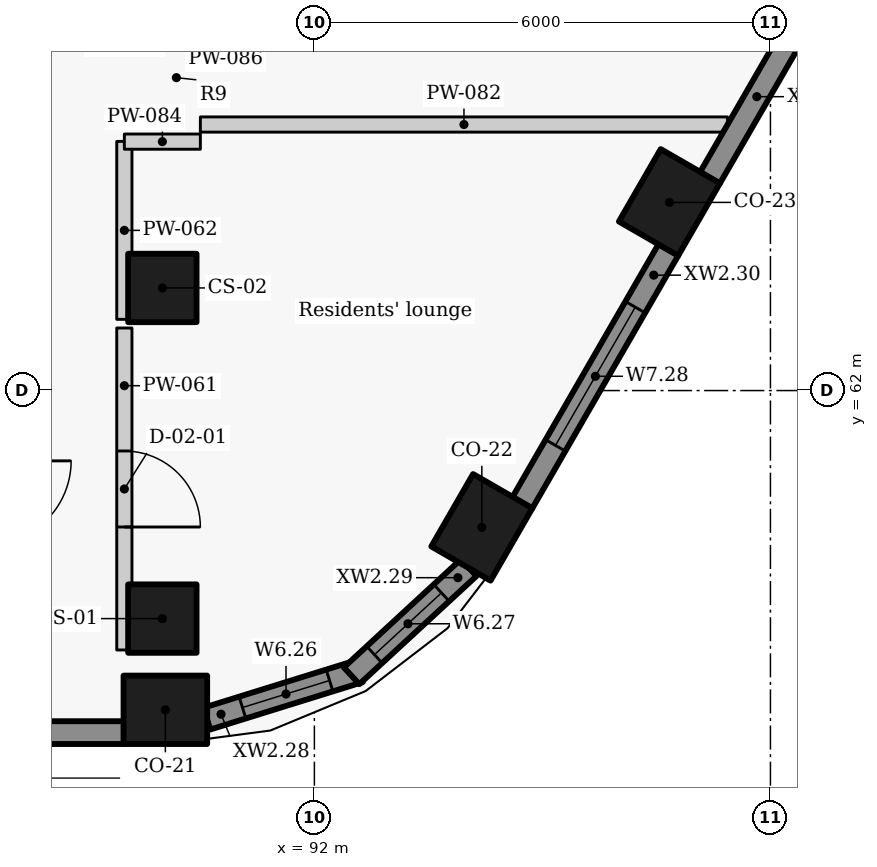
"""IFC4 building model, lengths in metres.
Left out: names, types, materials, properties, quantities, classifications, styles, units other than length and angle.
Written with IfcOpenShell. Run it as: python <this file> out.ifc"""

import sys

from ifc_helpers import new_model, si_unit, direction, frame, frame_2d, origin, origin_2d, place, context, subcontext, project, spatial, rectangle, extrude, element, fill, save


model = new_model("IFC4")
c1 = context("Model", 3, precision=1e-05, world=origin(), true_north=direction((0.0, 1.0)))
c2 = subcontext(c1, "Body", "Model", "MODEL_VIEW")
j1 = project(units=[si_unit("LENGTHUNIT", "METRE"), si_unit("PLANEANGLEUNIT", "RADIAN")], contexts=[c1])
p1 = place(None, origin())
s1 = spatial("IfcSite", under=j1, at=p1, CompositionType="ELEMENT")
p2 = place(p1, origin())
s2 = spatial("IfcBuilding", under=s1, at=p2, CompositionType="ELEMENT")
p3 = place(p2, frame((0.0, 0.0, 239.4)))
s3 = spatial("IfcBuildingStorey", under=s2, at=p3, CompositionType="ELEMENT", Elevation=239.4)
for number, where, z_axis, x_axis in (
    (1, (90.04, 57.8, 0.0), (0.0, 0.0, 1.0), (1.0, 0.0, 0.0)),
    (2, (94.203, 60.2, 0.0), (0.0, 0.0, 1.0), (0.5, 0.866, 0.0)),
    (3, (96.671, 64.475, 0.0), (0.0, 0.0, 1.0), (0.5, 0.866, 0.0)),
):
    element("IfcColumn", number, at=place(p3, frame(where, z_axis=z_axis, x_axis=x_axis)), inside=s3, PredefinedType="COLUMN", context=c2, shape_type="SweptSolid", body=[
        extrude(rectangle(XDim=1.1, YDim=0.9, at=origin_2d()), origin(), (0.0, 0.0, 1.0), 3.3),
    ])
for number, where, z_axis, x_axis in (
    (4, (90.0, 59.0, 0.0), (0.0, 0.0, 1.0), (0.0, 1.0, 0.0)),
    (5, (90.0, 63.35, 0.0), (0.0, 0.0, 1.0), (0.0, 1.0, 0.0)),
):
    element("IfcColumn", number, at=place(p3, frame(where, z_axis=z_axis, x_axis=x_axis)), inside=s3, PredefinedType="COLUMN", context=c2, shape_type="SweptSolid", body=[
        extrude(rectangle(XDim=0.9, YDim=0.9, at=origin_2d()), origin(), (0.0, 0.0, 1.0), 3.3),
    ])
p4 = place(p3, frame((70.501, 57.5, 0.0), z_axis=(0.0, 0.0, 1.0), x_axis=(1.0, 0.0, 0.0)))
e6 = element("IfcWall", 6, at=p4, inside=s3, PredefinedType="SOLIDWALL", context=c2, shape_type="SweptSolid", body=[
    extrude(rectangle(XDim=18.993, YDim=0.3, at=frame_2d((9.496, 0.0))), origin(), (0.0, 0.0, 1.0), 2.425),
])
p5 = place(p3, frame((90.586, 57.684, 0.0), z_axis=(0.0, 0.0, 1.0), x_axis=(0.954941641926, 0.296793632875, 0.0)))
e7 = element("IfcWall", 7, at=p5, inside=s3, PredefinedType="SOLIDWALL", context=c2, shape_type="SweptSolid", body=[
    extrude(rectangle(XDim=2.103, YDim=0.3, at=frame_2d((1.051, 0.0))), origin(), (0.0, 0.0, 1.0), 2.425),
])
p6 = place(p5, frame((0.49, 0.0, 0.9)))
e8 = element("IfcOpeningElement", 8, at=p6, cuts=e7, PredefinedType="OPENING", context=c2, shape_type="SweptSolid", body=[
    extrude(rectangle(XDim=1.2, YDim=1.1, at=frame_2d((0.6, 0.55))), frame((0.0, 0.16, 0.0), z_axis=(0.0, -1.0, 0.0), x_axis=(1.0, 0.0, 0.0)), (0.0, 0.0, 1.0), 0.32),
])
p7 = place(p3, frame((92.49, 58.247, 0.0), z_axis=(0.0, 0.0, 1.0), x_axis=(0.734830223907, 0.678251090698, 0.0)))
e9 = element("IfcWall", 9, at=p7, inside=s3, PredefinedType="SOLIDWALL", context=c2, shape_type="SweptSolid", body=[
    extrude(rectangle(XDim=2.097, YDim=0.3, at=frame_2d((1.049, 0.0))), origin(), (0.0, 0.0, 1.0), 2.425),
])
p8 = place(p7, frame((0.409, 0.0, 0.9)))
e10 = element("IfcOpeningElement", 10, at=p8, cuts=e9, PredefinedType="OPENING", context=c2, shape_type="SweptSolid", body=[
    extrude(rectangle(XDim=1.2, YDim=1.1, at=frame_2d((0.6, 0.55))), frame((0.0, 0.16, 0.0), z_axis=(0.0, -1.0, 0.0), x_axis=(1.0, 0.0, 0.0)), (0.0, 0.0, 1.0), 0.32),
])
p9 = place(p3, frame((94.736, 60.523, 0.0), z_axis=(0.0, 0.0, 1.0), x_axis=(0.499984490703, 0.866034357896, 0.0)))
e11 = element("IfcWall", 11, at=p9, inside=s3, PredefinedType="SOLIDWALL", context=c2, shape_type="SweptSolid", body=[
    extrude(rectangle(XDim=3.844, YDim=0.3, at=frame_2d((1.922, 0.0))), origin(), (0.0, 0.0, 1.0), 2.425),
])
p10 = place(p9, frame((0.872, 0.0, 0.9)))
e12 = element("IfcOpeningElement", 12, at=p10, cuts=e11, PredefinedType="OPENING", context=c2, shape_type="SweptSolid", body=[
    extrude(rectangle(XDim=2.1, YDim=1.1, at=frame_2d((1.05, 0.55))), frame((0.0, 0.16, 0.0), z_axis=(0.0, -1.0, 0.0), x_axis=(1.0, 0.0, 0.0)), (0.0, 0.0, 1.0), 0.32),
])
p11 = place(p3, frame((97.204, 64.798, 0.0), z_axis=(0.0, 0.0, 1.0), x_axis=(0.499984490703, 0.866034357896, 0.0)))
e13 = element("IfcWall", 13, at=p11, inside=s3, PredefinedType="SOLIDWALL", context=c2, shape_type="SweptSolid", body=[
    extrude(rectangle(XDim=3.844, YDim=0.3, at=frame_2d((1.922, 0.0))), origin(), (0.0, 0.0, 1.0), 2.425),
])
p12 = place(p11, frame((2.567, 0.0, 0.9)))
e14 = element("IfcOpeningElement", 14, at=p12, cuts=e13, PredefinedType="OPENING", context=c2, shape_type="SweptSolid", body=[
    extrude(rectangle(XDim=0.9, YDim=1.1, at=frame_2d((0.45, 0.55))), frame((0.0, 0.16, 0.0), z_axis=(0.0, -1.0, 0.0), x_axis=(1.0, 0.0, 0.0)), (0.0, 0.0, 1.0), 0.32),
])
p13 = place(p3, frame((89.5, 62.823, 0.0), z_axis=(0.0, 0.0, 1.0), x_axis=(0.0, -1.0, 0.0)))
e15 = element("IfcWall", 15, at=p13, inside=s3, PredefinedType="PARTITIONING", context=c2, shape_type="SweptSolid", body=[
    extrude(rectangle(XDim=4.236, YDim=0.2, at=frame_2d((2.118, 0.0))), origin(), (0.0, 0.0, 1.0), 3.025),
])
p14 = place(p13, frame((1.618, 0.0, 0.0)))
e16 = element("IfcOpeningElement", 16, at=p14, cuts=e15, PredefinedType="OPENING", context=c2, shape_type="SweptSolid", body=[
    extrude(rectangle(XDim=1.0, YDim=2.1, at=frame_2d((0.5, 1.05))), frame((0.0, 0.11, 0.0), z_axis=(0.0, -1.0, 0.0), x_axis=(1.0, 0.0, 0.0)), (0.0, 0.0, 1.0), 0.22),
])
p15 = place(p3, frame((89.5, 62.937, 0.0), z_axis=(0.0, 0.0, 1.0), x_axis=(0.0, 1.0, 0.0)))
e17 = element("IfcWall", 17, at=p15, inside=s3, PredefinedType="PARTITIONING", context=c2, shape_type="SweptSolid", body=[
    extrude(rectangle(XDim=2.341, YDim=0.2, at=frame_2d((1.17, 0.0))), origin(), (0.0, 0.0, 1.0), 3.025),
])
p16 = place(p3, frame((90.5, 65.5, 0.0), z_axis=(0.0, 0.0, 1.0), x_axis=(1.0, 0.0, 0.0)))
e18 = element("IfcWall", 18, at=p16, inside=s3, PredefinedType="PARTITIONING", context=c2, shape_type="SweptSolid", body=[
    extrude(rectangle(XDim=6.936, YDim=0.2, at=frame_2d((3.468, 0.0))), origin(), (0.0, 0.0, 1.0), 2.405),
])
p17 = place(p3, frame((89.5, 65.275, 0.0), z_axis=(0.0, 0.0, 1.0), x_axis=(1.0, 0.0, 0.0)))
e19 = element("IfcWall", 19, at=p17, inside=s3, PredefinedType="PARTITIONING", context=c2, shape_type="SweptSolid", body=[
    extrude(rectangle(XDim=1.0, YDim=0.2, at=frame_2d((0.5, 0.0))), origin(), (0.0, 0.0, 1.0), 2.505),
])
p18 = place(p6, origin())
e20 = element("IfcWindow", 20, at=p18, inside=s3, PartitioningType="SINGLE_PANEL", PredefinedType="WINDOW", context=c2, shape_type="SweptSolid", body=[
    extrude(rectangle(XDim=1.2, YDim=1.1, at=frame_2d((0.6, 0.55))), frame((0.0, 0.03, 0.0), z_axis=(0.0, -1.0, 0.0), x_axis=(1.0, 0.0, 0.0)), (0.0, 0.0, 1.0), 0.06),
])
fill(e8, e20)
p19 = place(p8, origin())
e21 = element("IfcWindow", 21, at=p19, inside=s3, PartitioningType="SINGLE_PANEL", PredefinedType="WINDOW", context=c2, shape_type="SweptSolid", body=[
    extrude(rectangle(XDim=1.2, YDim=1.1, at=frame_2d((0.6, 0.55))), frame((0.0, 0.03, 0.0), z_axis=(0.0, -1.0, 0.0), x_axis=(1.0, 0.0, 0.0)), (0.0, 0.0, 1.0), 0.06),
])
fill(e10, e21)
p20 = place(p10, origin())
e22 = element("IfcWindow", 22, at=p20, inside=s3, PartitioningType="SINGLE_PANEL", PredefinedType="WINDOW", context=c2, shape_type="SweptSolid", body=[
    extrude(rectangle(XDim=2.1, YDim=1.1, at=frame_2d((1.05, 0.55))), frame((0.0, 0.03, 0.0), z_axis=(0.0, -1.0, 0.0), x_axis=(1.0, 0.0, 0.0)), (0.0, 0.0, 1.0), 0.06),
])
fill(e12, e22)
p21 = place(p14, origin())
e23 = element("IfcDoor", 23, at=p21, inside=s3, OperationType="SINGLE_SWING_RIGHT", PredefinedType="DOOR", context=c2, shape_type="SweptSolid", body=[
    extrude(rectangle(XDim=1.0, YDim=2.1, at=frame_2d((0.5, 1.05))), frame((0.0, 0.025, 0.0), z_axis=(0.0, -1.0, 0.0), x_axis=(1.0, 0.0, 0.0)), (0.0, 0.0, 1.0), 0.05),
])
fill(e16, e23)
save(model, sys.argv[1])
